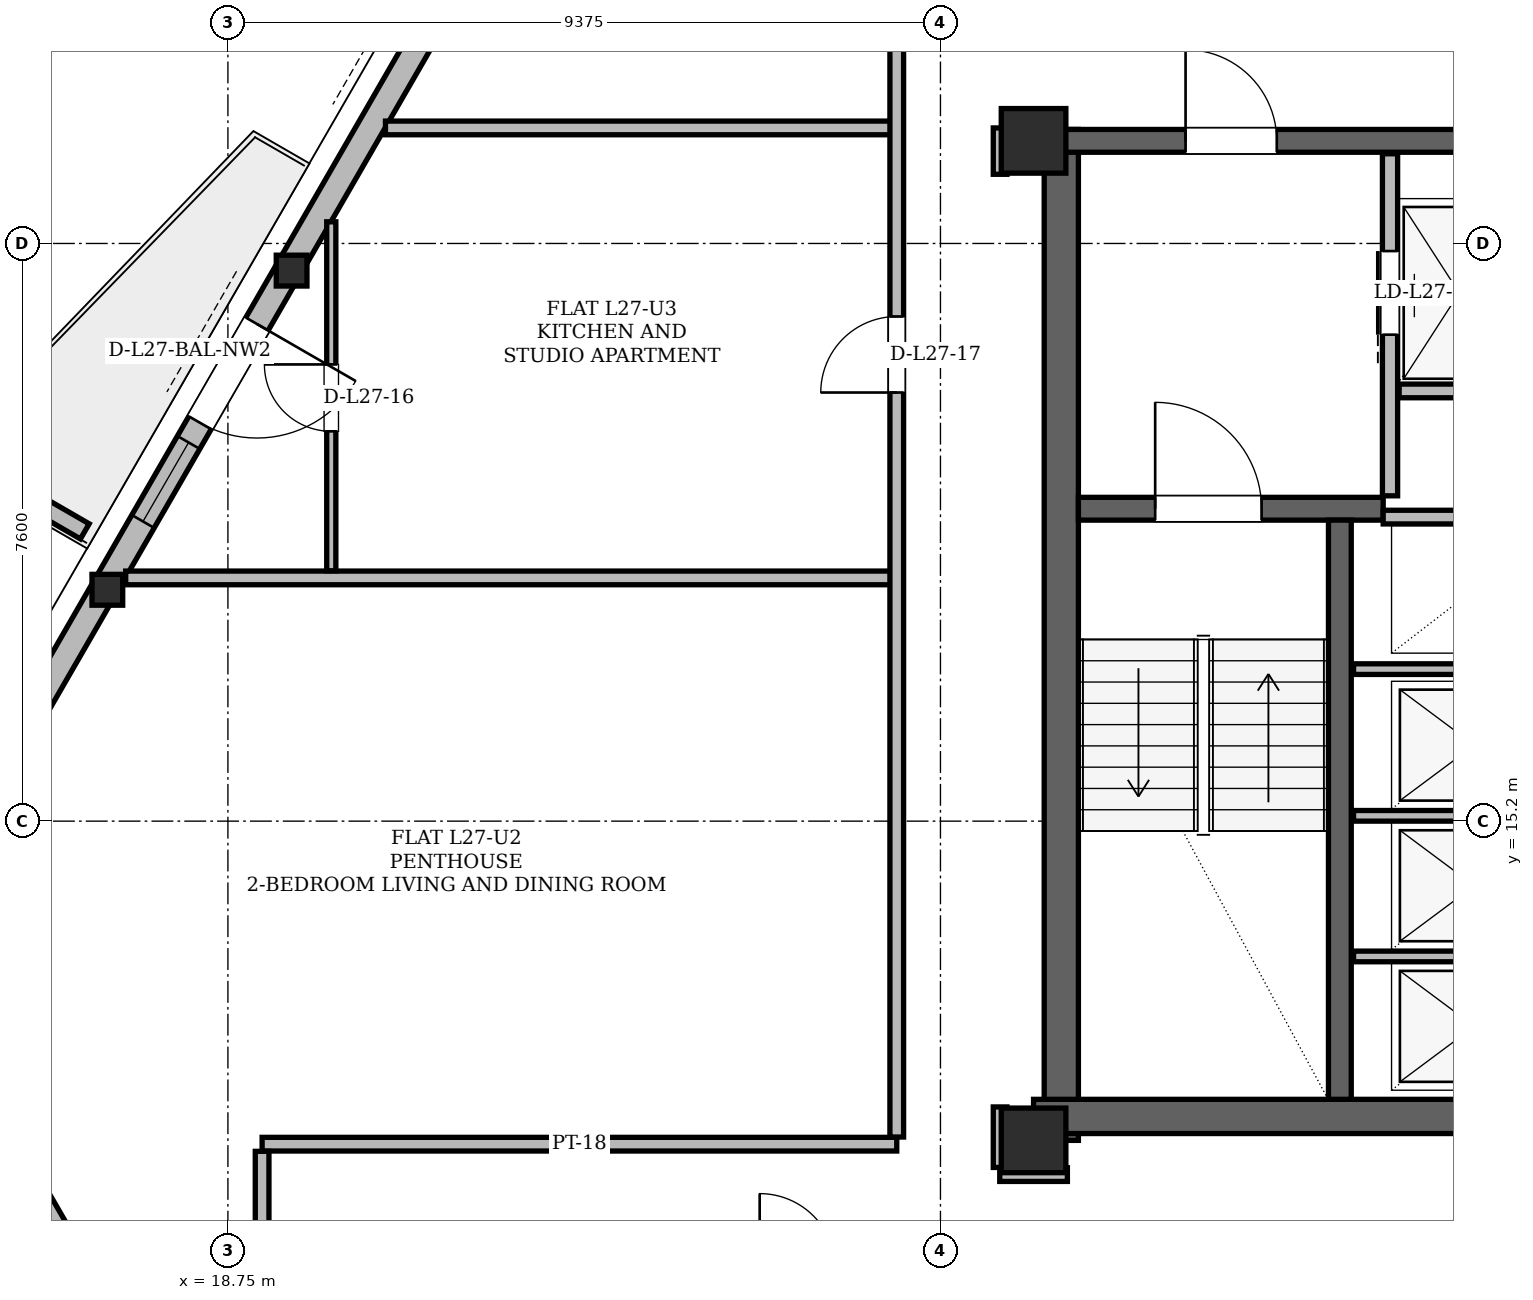
"""IFC4 building model, lengths in metres.
Left out: names, types, materials, properties, quantities, classifications, styles, units other than length and angle.
Written with IfcOpenShell. Run it as: python <this file> out.ifc"""

import sys

from ifc_helpers import new_model, si_unit, direction, frame, frame_2d, origin, origin_2d, place, context, subcontext, project, spatial, polyline, rectangle, hollow_rectangle, i_section, outline, extrude, element, fill, save


model = new_model("IFC4")
c1 = context("Model", 3, precision=1e-05, world=origin(), true_north=direction((0.0, 1.0)))
c2 = subcontext(c1, "Body", "Model", "MODEL_VIEW")
j1 = project(units=[si_unit("LENGTHUNIT", "METRE"), si_unit("PLANEANGLEUNIT", "RADIAN")], contexts=[c1])
p1 = place(None, origin())
s1 = spatial("IfcSite", under=j1, at=p1, CompositionType="ELEMENT")
p2 = place(p1, origin())
s2 = spatial("IfcBuilding", under=s1, at=p2, CompositionType="ELEMENT")
p3 = place(p2, frame((0.0, 0.0, 104.1)))
s3 = spatial("IfcBuildingStorey", under=s2, at=p3, CompositionType="ELEMENT", Elevation=104.1)
for number, where, z_axis, x_axis in (
    (1, (29.35, 11.0, 0.0), (0.0, 0.0, 1.0), (1.0, 0.0, 0.0)),
    (2, (29.35, 24.15, 0.0), (0.0, 0.0, 1.0), (1.0, 0.0, 0.0)),
):
    element("IfcColumn", number, at=place(p3, frame(where, z_axis=z_axis, x_axis=x_axis)), inside=s3, PredefinedType="COLUMN", context=c2, shape_type="SweptSolid", body=[
        extrude(hollow_rectangle(XDim=0.85, YDim=0.85, WallThickness=0.07, at=origin_2d()), origin(), (0.0, 0.0, 1.0), 3.6),
    ])
p4 = place(p3, frame((19.555, 22.471, 0.004), z_axis=(0.018622524127, -0.015700011216, 0.999703311609), x_axis=(0.644565272957, 0.764549284806, 0.0)))
e3 = element("IfcColumn", 3, at=p4, inside=s3, PredefinedType="COLUMN", context=c2, shape_type="SweptSolid", body=[
    extrude(i_section(OverallWidth=0.404, OverallDepth=0.406, WebThickness=0.027, FlangeThickness=0.044, at=origin_2d()), origin(), (0.0, 0.0, 1.0), 3.592),
])
p5 = place(p3, frame((17.133, 18.277, 0.004), z_axis=(0.01705900415, -0.018418287349, 0.999684828868), x_axis=(0.733660694323, 0.679515993635, 0.0)))
e4 = element("IfcColumn", 4, at=p5, inside=s3, PredefinedType="COLUMN", context=c2, shape_type="SweptSolid", body=[
    extrude(i_section(OverallWidth=0.404, OverallDepth=0.406, WebThickness=0.027, FlangeThickness=0.044, at=origin_2d()), origin(), (0.0, 0.0, 1.0), 3.592),
])
p6 = place(p3, frame((29.715, 11.0, 0.0), z_axis=(0.0, 0.0, 1.0), x_axis=(0.0, 1.0, 0.0)))
e5 = element("IfcWall", 5, at=p6, inside=s3, PredefinedType="SHEAR", context=c2, shape_type="SweptSolid", body=[
    extrude(rectangle(XDim=13.3, YDim=0.45, at=frame_2d((6.65, 0.0))), origin(), (0.0, 0.0, 1.0), 3.36),
])
p7 = place(p3, frame((29.35, 11.315, 0.0), z_axis=(0.0, 0.0, 1.0), x_axis=(1.0, 0.0, 0.0)))
e6 = element("IfcWall", 6, at=p7, inside=s3, PredefinedType="SHEAR", context=c2, shape_type="SweptSolid", body=[
    extrude(rectangle(XDim=7.1, YDim=0.45, at=frame_2d((3.55, 0.0))), origin(), (0.0, 0.0, 1.0), 3.36),
])
p8 = place(p3, frame((29.65, 24.15, 0.0), z_axis=(0.0, 0.0, 1.0), x_axis=(1.0, 0.0, 0.0)))
e7 = element("IfcWall", 7, at=p8, inside=s3, PredefinedType="SHEAR", context=c2, shape_type="SweptSolid", body=[
    extrude(rectangle(XDim=15.7, YDim=0.3, at=frame_2d((7.85, 0.0))), origin(), (0.0, 0.0, 1.0), 3.36),
])
p9 = place(p8, frame((1.7, 0.0, 0.0)))
e8 = element("IfcOpeningElement", 8, at=p9, cuts=e7, PredefinedType="OPENING", context=c2, shape_type="SweptSolid", body=[
    extrude(rectangle(XDim=1.2, YDim=2.2, at=frame_2d((0.6, 1.1))), frame((0.0, 0.15, 0.0), z_axis=(0.0, -1.0, 0.0), x_axis=(1.0, 0.0, 0.0)), (0.0, 0.0, 1.0), 0.3),
])
p10 = place(p8, frame((12.8, 0.0, 0.0)))
e9 = element("IfcOpeningElement", 9, at=p10, cuts=e7, PredefinedType="OPENING", context=c2, shape_type="SweptSolid", body=[
    extrude(rectangle(XDim=1.2, YDim=2.2, at=frame_2d((0.6, 1.1))), frame((0.0, 0.15, 0.0), z_axis=(0.0, -1.0, 0.0), x_axis=(1.0, 0.0, 0.0)), (0.0, 0.0, 1.0), 0.3),
])
p11 = place(p8, frame((7.4, 0.0, 0.0)))
e10 = element("IfcOpeningElement", 10, at=p11, cuts=e7, PredefinedType="OPENING", context=c2, shape_type="SweptSolid", body=[
    extrude(rectangle(XDim=0.9, YDim=2.05, at=frame_2d((0.45, 1.025))), frame((0.0, 0.15, 0.0), z_axis=(0.0, -1.0, 0.0), x_axis=(1.0, 0.0, 0.0)), (0.0, 0.0, 1.0), 0.3),
])
p12 = place(p3, frame((29.94, 19.31, 0.0), z_axis=(0.0, 0.0, 1.0), x_axis=(1.0, 0.0, 0.0)))
e11 = element("IfcWall", 11, at=p12, inside=s3, PredefinedType="SHEAR", context=c2, shape_type="SweptSolid", body=[
    extrude(rectangle(XDim=4.01, YDim=0.3, at=frame_2d((2.005, 0.0))), origin(), (0.0, 0.0, 1.0), 3.36),
])
p13 = place(p12, frame((1.01, 0.0, 0.0)))
e12 = element("IfcOpeningElement", 12, at=p13, cuts=e11, PredefinedType="OPENING", context=c2, shape_type="SweptSolid", body=[
    extrude(rectangle(XDim=1.4, YDim=2.2, at=frame_2d((0.7, 1.1))), frame((0.0, 0.15, 0.0), z_axis=(0.0, -1.0, 0.0), x_axis=(1.0, 0.0, 0.0)), (0.0, 0.0, 1.0), 0.3),
])
p14 = place(p3, frame((33.38, 11.54, 0.0), z_axis=(0.0, 0.0, 1.0), x_axis=(0.0, 1.0, 0.0)))
e13 = element("IfcWall", 13, at=p14, inside=s3, PredefinedType="SHEAR", context=c2, shape_type="SweptSolid", body=[
    extrude(rectangle(XDim=7.62, YDim=0.3, at=frame_2d((3.81, 0.0))), origin(), (0.0, 0.0, 1.0), 3.36),
])
p15 = place(p3, frame((14.365, 13.483, 0.0), z_axis=(0.0, 0.0, 1.0), x_axis=(0.499998829152, -0.866026079773, 0.0)))
e14 = element("IfcWall", 14, at=p15, inside=s3, PredefinedType="SOLIDWALL", context=c2, shape_type="SweptSolid", body=[
    extrude(rectangle(XDim=11.674, YDim=0.34, at=frame_2d((5.837, 0.0))), origin(), (0.0, 0.0, 1.0), 2.578),
])
p16 = place(p15, frame((8.995, 0.0, 0.85)))
e15 = element("IfcOpeningElement", 15, at=p16, cuts=e14, PredefinedType="OPENING", context=c2, shape_type="SweptSolid", body=[
    extrude(rectangle(XDim=1.2, YDim=1.48, at=frame_2d((0.6, 0.74))), frame((0.0, 0.17, 0.0), z_axis=(0.0, -1.0, 0.0), x_axis=(1.0, 0.0, 0.0)), (0.0, 0.0, 1.0), 0.34),
])
p17 = place(p3, frame((31.663, 43.444, 0.0), z_axis=(0.0, 0.0, 1.0), x_axis=(-0.499998569178, -0.866026229868, 0.0)))
e16 = element("IfcWall", 16, at=p17, inside=s3, PredefinedType="SOLIDWALL", context=c2, shape_type="SweptSolid", body=[
    extrude(rectangle(XDim=34.595, YDim=0.34, at=frame_2d((17.298, 0.0))), origin(), (0.0, 0.0, 1.0), 2.578),
])
p18 = place(p17, frame((3.219, 0.0, 0.0)))
e17 = element("IfcOpeningElement", 17, at=p18, cuts=e16, PredefinedType="OPENING", context=c2, shape_type="SweptSolid", body=[
    extrude(rectangle(XDim=1.5, YDim=2.2, at=frame_2d((0.75, 1.1))), frame((0.0, 0.17, 0.0), z_axis=(0.0, -1.0, 0.0), x_axis=(1.0, 0.0, 0.0)), (0.0, 0.0, 1.0), 0.34),
])
p19 = place(p17, frame((25.061, 0.0, 0.0)))
e18 = element("IfcOpeningElement", 18, at=p19, cuts=e16, PredefinedType="OPENING", context=c2, shape_type="SweptSolid", body=[
    extrude(rectangle(XDim=1.5, YDim=2.2, at=frame_2d((0.75, 1.1))), frame((0.0, 0.17, 0.0), z_axis=(0.0, -1.0, 0.0), x_axis=(1.0, 0.0, 0.0)), (0.0, 0.0, 1.0), 0.34),
])
p20 = place(p17, frame((31.728, 0.0, 0.85)))
e19 = element("IfcOpeningElement", 19, at=p20, cuts=e16, PredefinedType="OPENING", context=c2, shape_type="SweptSolid", body=[
    extrude(rectangle(XDim=1.6, YDim=1.618, at=frame_2d((0.8, 0.809))), frame((0.0, 0.17, 0.0), z_axis=(0.0, -1.0, 0.0), x_axis=(1.0, 0.0, 0.0)), (0.0, 0.0, 1.0), 0.34),
])
p21 = place(p17, frame((26.86, 0.0, 0.85)))
e20 = element("IfcOpeningElement", 20, at=p21, cuts=e16, PredefinedType="OPENING", context=c2, shape_type="SweptSolid", body=[
    extrude(rectangle(XDim=1.2, YDim=1.48, at=frame_2d((0.6, 0.74))), frame((0.0, 0.17, 0.0), z_axis=(0.0, -1.0, 0.0), x_axis=(1.0, 0.0, 0.0)), (0.0, 0.0, 1.0), 0.34),
])
p22 = place(p17, frame((11.256, 0.0, 0.85)))
e21 = element("IfcOpeningElement", 21, at=p22, cuts=e16, PredefinedType="OPENING", context=c2, shape_type="SweptSolid", body=[
    extrude(rectangle(XDim=1.8, YDim=1.618, at=frame_2d((0.9, 0.809))), frame((0.0, 0.17, 0.0), z_axis=(0.0, -1.0, 0.0), x_axis=(1.0, 0.0, 0.0)), (0.0, 0.0, 1.0), 0.34),
])
p23 = place(p17, frame((18.593, 0.0, 0.85)))
e22 = element("IfcOpeningElement", 22, at=p23, cuts=e16, PredefinedType="OPENING", context=c2, shape_type="SweptSolid", body=[
    extrude(rectangle(XDim=1.2, YDim=1.48, at=frame_2d((0.6, 0.74))), frame((0.0, 0.17, 0.0), z_axis=(0.0, -1.0, 0.0), x_axis=(1.0, 0.0, 0.0)), (0.0, 0.0, 1.0), 0.34),
])
p24 = place(p17, frame((1.106, 0.0, 0.85)))
e23 = element("IfcOpeningElement", 23, at=p24, cuts=e16, PredefinedType="OPENING", context=c2, shape_type="SweptSolid", body=[
    extrude(rectangle(XDim=1.6, YDim=1.618, at=frame_2d((0.8, 0.809))), frame((0.0, 0.17, 0.0), z_axis=(0.0, -1.0, 0.0), x_axis=(1.0, 0.0, 0.0)), (0.0, 0.0, 1.0), 0.34),
])
p25 = place(p3, frame((16.867, 19.012, 0.0), z_axis=(0.0, 0.0, 1.0), x_axis=(-0.866012356593, 0.500022597718, 0.0)))
e24 = element("IfcWall", 24, at=p25, inside=s3, PredefinedType="PARAPET", context=c2, shape_type="SweptSolid", body=[
    extrude(outline(polyline([(0.0, 0.0), (2.042, 0.0), (2.042, 1.1), (0.0, 1.32), (0.0, 0.0)])), frame((0.0, 0.115, 0.0), z_axis=(0.0, -1.0, 0.0), x_axis=(1.0, 0.0, 0.0)), (0.0, 0.0, 1.0), 0.23),
])
p26 = place(p3, frame((34.04, 19.48, 0.0), z_axis=(0.0, 0.0, 1.0), x_axis=(0.0, 1.0, 0.0)))
e25 = element("IfcWall", 25, at=p26, inside=s3, PredefinedType="PARTITIONING", context=c2, shape_type="SweptSolid", body=[
    extrude(rectangle(XDim=4.5, YDim=0.2, at=frame_2d((2.25, 0.0))), origin(), (0.0, 0.0, 1.0), 2.4),
])
p27 = place(p26, frame((2.12, 0.0, 0.0)))
e26 = element("IfcOpeningElement", 26, at=p27, cuts=e25, PredefinedType="OPENING", context=c2, shape_type="SweptSolid", body=[
    extrude(rectangle(XDim=1.1, YDim=2.2, at=frame_2d((0.55, 1.1))), frame((0.0, 0.1, 0.0), z_axis=(0.0, -1.0, 0.0), x_axis=(1.0, 0.0, 0.0)), (0.0, 0.0, 1.0), 0.2),
])
p28 = place(p3, frame((34.16, 20.86, 0.0), z_axis=(0.0, 0.0, 1.0), x_axis=(1.0, 0.0, 0.0)))
e27 = element("IfcWall", 27, at=p28, inside=s3, PredefinedType="PARTITIONING", context=c2, shape_type="SweptSolid", body=[
    extrude(rectangle(XDim=1.58, YDim=0.18, at=frame_2d((0.79, 0.0))), origin(), (0.0, 0.0, 1.0), 3.36),
])
p29 = place(p3, frame((33.95, 19.2, 0.0), z_axis=(0.0, 0.0, 1.0), x_axis=(1.0, 0.0, 0.0)))
e28 = element("IfcWall", 28, at=p29, inside=s3, PredefinedType="PARTITIONING", context=c2, shape_type="SweptSolid", body=[
    extrude(rectangle(XDim=2.27, YDim=0.18, at=frame_2d((1.135, 0.0))), origin(), (0.0, 0.0, 1.0), 3.36),
])
for number, where, z_axis, x_axis in (
    (29, (33.56, 13.42, 0.0), (0.0, 0.0, 1.0), (1.0, 0.0, 0.0)),
    (30, (33.56, 15.27, 0.0), (0.0, 0.0, 1.0), (1.0, 0.0, 0.0)),
    (31, (33.56, 17.2, 0.0), (0.0, 0.0, 1.0), (1.0, 0.0, 0.0)),
):
    element("IfcWall", number, at=place(p3, frame(where, z_axis=z_axis, x_axis=x_axis)), inside=s3, PredefinedType="PARTITIONING", context=c2, shape_type="SweptSolid", body=[
        extrude(rectangle(XDim=2.66, YDim=0.14, at=frame_2d((1.33, 0.0))), origin(), (0.0, 0.0, 1.0), 3.36),
    ])
p30 = place(p3, frame((28.905, 10.55, 0.0), z_axis=(0.0, 0.0, 1.0), x_axis=(1.0, 0.0, 0.0)))
e32 = element("IfcWall", 32, at=p30, inside=s3, PredefinedType="PARTITIONING", context=c2, shape_type="SweptSolid", body=[
    extrude(rectangle(XDim=0.89, YDim=0.18, at=frame_2d((0.445, 0.0))), origin(), (0.0, 0.0, 1.0), 3.36),
])
p31 = place(p3, frame((19.2, 10.95, 0.0), z_axis=(0.0, 0.0, 1.0), x_axis=(1.0, 0.0, 0.0)))
e33 = element("IfcWall", 33, at=p31, inside=s3, PredefinedType="PARTITIONING", context=c2, shape_type="SweptSolid", body=[
    extrude(rectangle(XDim=8.35, YDim=0.18, at=frame_2d((4.175, 0.0))), origin(), (0.0, 0.0, 1.0), 3.36),
])
p32 = place(p3, frame((17.405, 18.4, 0.0), z_axis=(0.0, 0.0, 1.0), x_axis=(1.0, 0.0, 0.0)))
e34 = element("IfcWall", 34, at=p32, inside=s3, PredefinedType="PARTITIONING", context=c2, shape_type="SweptSolid", body=[
    extrude(rectangle(XDim=10.205, YDim=0.18, at=frame_2d((5.103, 0.0))), origin(), (0.0, 0.0, 1.0), 3.36),
])
p33 = place(p3, frame((20.823, 24.32, 0.0), z_axis=(0.0, 0.0, 1.0), x_axis=(1.0, 0.0, 0.0)))
e35 = element("IfcWall", 35, at=p33, inside=s3, PredefinedType="PARTITIONING", context=c2, shape_type="SweptSolid", body=[
    extrude(rectangle(XDim=6.787, YDim=0.18, at=frame_2d((3.394, 0.0))), origin(), (0.0, 0.0, 1.0), 3.36),
])
p34 = place(p3, frame((19.2, 9.394, 0.0), z_axis=(0.0, 0.0, 1.0), x_axis=(0.0, 1.0, 0.0)))
e36 = element("IfcWall", 36, at=p34, inside=s3, PredefinedType="PARTITIONING", context=c2, shape_type="SweptSolid", body=[
    extrude(rectangle(XDim=1.462, YDim=0.18, at=frame_2d((0.731, 0.0))), origin(), (0.0, 0.0, 1.0), 3.36),
])
p35 = place(p3, frame((20.11, 18.494, 0.0), z_axis=(0.0, 0.0, 1.0), x_axis=(0.0, 1.0, 0.0)))
e37 = element("IfcWall", 37, at=p35, inside=s3, PredefinedType="PARTITIONING", context=c2, shape_type="SweptSolid", body=[
    extrude(rectangle(XDim=4.591, YDim=0.12, at=frame_2d((2.295, 0.0))), origin(), (0.0, 0.0, 1.0), 2.578),
])
p36 = place(p35, frame((1.834, 0.0, 0.0)))
e38 = element("IfcOpeningElement", 38, at=p36, cuts=e37, PredefinedType="OPENING", context=c2, shape_type="SweptSolid", body=[
    extrude(rectangle(XDim=0.88, YDim=2.08, at=frame_2d((0.44, 1.04))), frame((0.0, 0.06, 0.0), z_axis=(0.0, -1.0, 0.0), x_axis=(1.0, 0.0, 0.0)), (0.0, 0.0, 1.0), 0.12),
])
p37 = place(p3, frame((27.55, 11.044, 0.0), z_axis=(0.0, 0.0, 1.0), x_axis=(0.0, 1.0, 0.0)))
e39 = element("IfcWall", 39, at=p37, inside=s3, PredefinedType="PARTITIONING", context=c2, shape_type="SweptSolid", body=[
    extrude(rectangle(XDim=14.832, YDim=0.18, at=frame_2d((7.416, 0.0))), origin(), (0.0, 0.0, 1.0), 2.814),
])
p38 = place(p37, frame((9.795, 0.0, 0.0)))
e40 = element("IfcOpeningElement", 40, at=p38, cuts=e39, PredefinedType="OPENING", context=c2, shape_type="SweptSolid", body=[
    extrude(rectangle(XDim=1.0, YDim=2.18, at=frame_2d((0.5, 1.09))), frame((0.0, 0.09, 0.0), z_axis=(0.0, -1.0, 0.0), x_axis=(1.0, 0.0, 0.0)), (0.0, 0.0, 1.0), 0.18),
])
p39 = place(p3, frame((28.91, 10.644, 0.0), z_axis=(0.0, 0.0, 1.0), x_axis=(0.0, 1.0, 0.0)))
e41 = element("IfcWall", 41, at=p39, inside=s3, PredefinedType="PARTITIONING", context=c2, shape_type="SweptSolid", body=[
    extrude(rectangle(XDim=0.796, YDim=0.18, at=frame_2d((0.398, 0.0))), origin(), (0.0, 0.0, 1.0), 2.814),
])
p40 = place(p3, frame((28.91, 23.71, 0.0), z_axis=(0.0, 0.0, 1.0), x_axis=(0.0, 1.0, 0.0)))
e42 = element("IfcWall", 42, at=p40, inside=s3, PredefinedType="PARTITIONING", context=c2, shape_type="SweptSolid", body=[
    extrude(rectangle(XDim=0.61, YDim=0.18, at=frame_2d((0.305, 0.0))), origin(), (0.0, 0.0, 1.0), 3.36),
])
p41 = place(p19, origin())
e43 = element("IfcDoor", 43, at=p41, inside=s3, OperationType="SINGLE_SWING_LEFT", PredefinedType="DOOR", context=c2, shape_type="SweptSolid", body=[
    extrude(rectangle(XDim=1.5, YDim=2.2, at=frame_2d((0.75, 1.1))), frame((0.0, 0.025, 0.0), z_axis=(0.0, -1.0, 0.0), x_axis=(1.0, 0.0, 0.0)), (0.0, 0.0, 1.0), 0.05),
])
fill(e18, e43)
p42 = place(p21, origin())
e44 = element("IfcWindow", 44, at=p42, inside=s3, PartitioningType="SINGLE_PANEL", PredefinedType="WINDOW", context=c2, shape_type="SweptSolid", body=[
    extrude(rectangle(XDim=1.2, YDim=1.48, at=frame_2d((0.6, 0.74))), frame((0.0, 0.03, 0.0), z_axis=(0.0, -1.0, 0.0), x_axis=(1.0, 0.0, 0.0)), (0.0, 0.0, 1.0), 0.06),
])
fill(e20, e44)
p43 = place(p27, origin())
e45 = element("IfcDoor", 45, at=p43, inside=s3, OperationType="SLIDING_TO_LEFT", PredefinedType="DOOR", context=c2, shape_type="SweptSolid", body=[
    extrude(rectangle(XDim=1.1, YDim=2.2, at=frame_2d((0.55, 1.1))), frame((0.0, 0.025, 0.0), z_axis=(0.0, -1.0, 0.0), x_axis=(1.0, 0.0, 0.0)), (0.0, 0.0, 1.0), 0.05),
])
fill(e26, e45)
p44 = place(p13, origin())
e46 = element("IfcDoor", 46, at=p44, inside=s3, OperationType="SINGLE_SWING_LEFT", PredefinedType="DOOR", context=c2, shape_type="SweptSolid", body=[
    extrude(rectangle(XDim=1.4, YDim=2.2, at=frame_2d((0.7, 1.1))), frame((0.0, 0.025, 0.0), z_axis=(0.0, -1.0, 0.0), x_axis=(1.0, 0.0, 0.0)), (0.0, 0.0, 1.0), 0.05),
])
fill(e12, e46)
p45 = place(p9, origin())
e47 = element("IfcDoor", 47, at=p45, inside=s3, OperationType="SINGLE_SWING_LEFT", PredefinedType="DOOR", context=c2, shape_type="SweptSolid", body=[
    extrude(rectangle(XDim=1.2, YDim=2.2, at=frame_2d((0.6, 1.1))), frame((0.0, 0.025, 0.0), z_axis=(0.0, -1.0, 0.0), x_axis=(1.0, 0.0, 0.0)), (0.0, 0.0, 1.0), 0.05),
])
fill(e8, e47)
p46 = place(p36, origin())
e48 = element("IfcDoor", 48, at=p46, inside=s3, OperationType="SINGLE_SWING_RIGHT", PredefinedType="DOOR", context=c2, shape_type="SweptSolid", body=[
    extrude(rectangle(XDim=0.88, YDim=2.08, at=frame_2d((0.44, 1.04))), frame((0.0, 0.025, 0.0), z_axis=(0.0, -1.0, 0.0), x_axis=(1.0, 0.0, 0.0)), (0.0, 0.0, 1.0), 0.05),
])
fill(e38, e48)
p47 = place(p38, origin())
e49 = element("IfcDoor", 49, at=p47, inside=s3, OperationType="SINGLE_SWING_LEFT", PredefinedType="DOOR", context=c2, shape_type="SweptSolid", body=[
    extrude(rectangle(XDim=1.0, YDim=2.18, at=frame_2d((0.5, 1.09))), frame((0.0, 0.025, 0.0), z_axis=(0.0, -1.0, 0.0), x_axis=(1.0, 0.0, 0.0)), (0.0, 0.0, 1.0), 0.05),
])
fill(e40, e49)
save(model, sys.argv[1])
